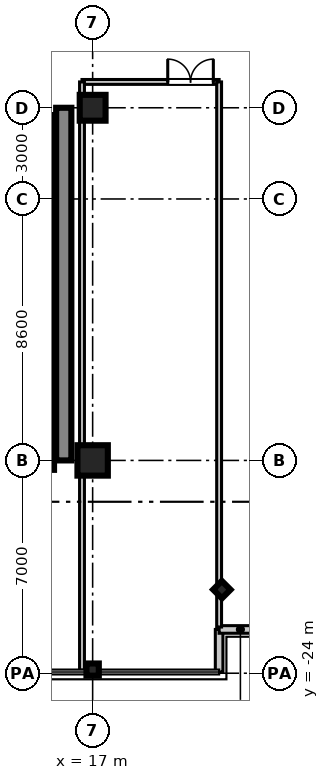
"""IFC4 building model, lengths in metres.
Left out: names, types, materials, properties, quantities, classifications, styles, units other than length and angle.
Written with IfcOpenShell. Run it as: python <this file> out.ifc"""

import sys

from ifc_helpers import new_model, si_unit, direction, frame, frame_2d, origin, origin_2d, place, context, subcontext, project, spatial, rectangle, i_section, extrude, source, transform, mapped, element, fill, save


model = new_model("IFC4")
c1 = context("Model", 3, precision=1e-05, world=origin(), true_north=direction((0.0, 1.0)))
c2 = subcontext(c1, "Body", "Model", "MODEL_VIEW")
j1 = project(units=[si_unit("LENGTHUNIT", "METRE"), si_unit("PLANEANGLEUNIT", "RADIAN")], contexts=[c1])
p1 = place(None, origin())
s1 = spatial("IfcSite", under=j1, at=p1, CompositionType="ELEMENT")
p2 = place(p1, origin())
s2 = spatial("IfcBuilding", under=s1, at=p2, CompositionType="ELEMENT")
p3 = place(p2, frame((0.0, 0.0, 249.3)))
s3 = spatial("IfcBuildingStorey", under=s2, at=p3, CompositionType="ELEMENT", Elevation=249.3)
m1 = source(origin(), c2, "Body", "SweptSolid", [
    extrude(rectangle(XDim=1.0, YDim=1.0, at=origin_2d()), origin(), (0.0, 0.0, 1.0), 3.655),
])
p4 = place(p3, frame((17.0, -17.0, 0.0), z_axis=(0.0, 0.0, 1.0), x_axis=(1.0, 0.0, 0.0)))
e1 = element("IfcColumn", 1, at=p4, inside=s3, PredefinedType="COLUMN", context=c2, shape_type="MappedRepresentation", body=[
    mapped(m1, transform((0.0, 0.0, 0.0), scale=1.0)),
])
m2 = source(origin(), c2, "Body", "SweptSolid", [
    extrude(rectangle(XDim=0.85, YDim=0.85, at=origin_2d()), origin(), (0.0, 0.0, 1.0), 3.655),
])
p5 = place(p3, frame((17.0, -5.4, 0.0), z_axis=(0.0, 0.0, 1.0), x_axis=(1.0, 0.0, 0.0)))
e2 = element("IfcColumn", 2, at=p5, inside=s3, PredefinedType="PILASTER", context=c2, shape_type="MappedRepresentation", body=[
    mapped(m2, transform((0.0, 0.0, 0.0), scale=1.0)),
])
m3 = source(origin(), c2, "Body", "SweptSolid", [
    extrude(i_section(OverallWidth=0.401, OverallDepth=0.406, WebThickness=0.016, FlangeThickness=0.025, at=origin_2d()), origin(), (0.0, 0.0, 1.0), 3.655),
])
for number, where, z_axis, x_axis in (
    (3, (17.0, -23.88, 0.0), (0.0, 0.0, 1.0), (0.0, 1.0, 0.0)),
    (4, (21.25, -21.25, 0.0), (0.0, 0.0, 1.0), (0.707, 0.707, 0.0)),
):
    element("IfcColumn", number, at=place(p3, frame(where, z_axis=z_axis, x_axis=x_axis)), inside=s3, PredefinedType="COLUMN", context=c2, shape_type="MappedRepresentation", body=[
        mapped(m3, transform((0.0, 0.0, 0.0), scale=1.0)),
    ])
m4 = source(origin(), c2, "Body", "SweptSolid", [
    extrude(rectangle(XDim=11.6, YDim=0.5, at=frame_2d((5.8, 0.0))), origin(), (0.0, 0.0, 1.0), 3.41),
])
p6 = place(p3, frame((16.05, -17.0, 0.0), z_axis=(0.0, 0.0, 1.0), x_axis=(0.0, 1.0, 0.0)))
e5 = element("IfcWall", 5, at=p6, inside=s3, PredefinedType="SHEAR", context=c2, shape_type="MappedRepresentation", body=[
    mapped(m4, transform((0.0, 0.0, 0.0), scale=1.0)),
])
m5 = source(origin(), c2, "Body", "SweptSolid", [
    extrude(rectangle(XDim=2.36, YDim=0.22, at=frame_2d((1.18, 0.0))), origin(), (0.0, 0.0, 1.0), 3.41),
])
p7 = place(p3, frame((15.62, -8.0, 0.0), z_axis=(0.0, 0.0, 1.0), x_axis=(0.0, 1.0, 0.0)))
e6 = element("IfcWall", 6, at=p7, inside=s3, PredefinedType="SHEAR", context=c2, shape_type="MappedRepresentation", body=[
    mapped(m5, transform((0.0, 0.0, 0.0), scale=1.0)),
])
m6 = source(origin(), c2, "Body", "SweptSolid", [
    extrude(rectangle(XDim=2.2, YDim=0.22, at=frame_2d((1.1, 0.0))), origin(), (0.0, 0.0, 1.0), 3.41),
])
for number, where, z_axis, x_axis in (
    (7, (15.62, -10.2, 0.0), (0.0, 0.0, 1.0), (0.0, 1.0, 0.0)),
    (8, (15.62, -12.4, 0.0), (0.0, 0.0, 1.0), (0.0, 1.0, 0.0)),
):
    element("IfcWall", number, at=place(p3, frame(where, z_axis=z_axis, x_axis=x_axis)), inside=s3, PredefinedType="SHEAR", context=c2, shape_type="MappedRepresentation", body=[
        mapped(m6, transform((0.0, 0.0, 0.0), scale=1.0)),
    ])
m7 = source(origin(), c2, "Body", "SweptSolid", [
    extrude(rectangle(XDim=2.3, YDim=0.22, at=frame_2d((1.15, 0.0))), origin(), (0.0, 0.0, 1.0), 3.41),
])
p8 = place(p3, frame((15.62, -14.7, 0.0), z_axis=(0.0, 0.0, 1.0), x_axis=(0.0, 1.0, 0.0)))
e9 = element("IfcWall", 9, at=p8, inside=s3, PredefinedType="SHEAR", context=c2, shape_type="MappedRepresentation", body=[
    mapped(m7, transform((0.0, 0.0, 0.0), scale=1.0)),
])
m8 = source(origin(), c2, "Body", "SweptSolid", [
    extrude(rectangle(XDim=2.61, YDim=0.22, at=frame_2d((1.305, 0.0))), origin(), (0.0, 0.0, 1.0), 3.41),
])
p9 = place(p3, frame((15.62, -17.31, 0.0), z_axis=(0.0, 0.0, 1.0), x_axis=(0.0, 1.0, 0.0)))
e10 = element("IfcWall", 10, at=p9, inside=s3, PredefinedType="SHEAR", context=c2, shape_type="MappedRepresentation", body=[
    mapped(m8, transform((0.0, 0.0, 0.0), scale=1.0)),
])
m9 = source(origin(), c2, "Body", "SweptSolid", [
    extrude(rectangle(XDim=1.4, YDim=0.25, at=frame_2d((0.7, 0.0))), origin(), (0.0, 0.0, 1.0), 3.41),
])
p10 = place(p3, frame((21.16, -23.96, 0.0), z_axis=(0.0, 0.0, 1.0), x_axis=(0.0, 1.0, 0.0)))
e11 = element("IfcWall", 11, at=p10, inside=s3, PredefinedType="STANDARD", context=c2, shape_type="MappedRepresentation", body=[
    mapped(m9, transform((0.0, 0.0, 0.0), scale=1.0)),
])
m10 = source(origin(), c2, "Body", "SweptSolid", [
    extrude(rectangle(XDim=1.4, YDim=0.25, at=frame_2d((0.7, 0.0))), origin(), (0.0, 0.0, 1.0), 3.41),
])
p11 = place(p3, frame((21.16, -22.56, 0.0), z_axis=(0.0, 0.0, 1.0), x_axis=(1.0, 0.0, 0.0)))
e12 = element("IfcWall", 12, at=p11, inside=s3, PredefinedType="STANDARD", context=c2, shape_type="MappedRepresentation", body=[
    mapped(m10, transform((0.0, 0.0, 0.0), scale=1.0)),
])
m11 = source(origin(), c2, "Body", "SweptSolid", [
    extrude(rectangle(XDim=4.51, YDim=0.16, at=frame_2d((2.255, 0.0))), origin(), (0.0, 0.0, 1.0), 2.75),
])
p12 = place(p3, frame((16.65, -4.55, 0.0), z_axis=(0.0, 0.0, 1.0), x_axis=(1.0, 0.0, 0.0)))
e13 = element("IfcWall", 13, at=p12, inside=s3, PredefinedType="PARTITIONING", context=c2, shape_type="MappedRepresentation", body=[
    mapped(m11, transform((0.0, 0.0, 0.0), scale=1.0)),
])
p13 = place(p12, frame((2.82, 0.0, 0.0)))
e14 = element("IfcOpeningElement", 14, at=p13, cuts=e13, PredefinedType="OPENING", context=c2, shape_type="SweptSolid", body=[
    extrude(rectangle(XDim=1.5, YDim=2.15, at=frame_2d((0.75, 1.075))), frame((0.0, 0.09, 0.0), z_axis=(0.0, -1.0, 0.0), x_axis=(1.0, 0.0, 0.0)), (0.0, 0.0, 1.0), 0.18),
])
m12 = source(origin(), c2, "Body", "SweptSolid", [
    extrude(rectangle(XDim=19.35, YDim=0.16, at=frame_2d((9.675, 0.0))), origin(), (0.0, 0.0, 1.0), 2.75),
])
p14 = place(p3, frame((16.65, -23.9, 0.0), z_axis=(0.0, 0.0, 1.0), x_axis=(0.0, 1.0, 0.0)))
e15 = element("IfcWall", 15, at=p14, inside=s3, PredefinedType="PARTITIONING", context=c2, shape_type="MappedRepresentation", body=[
    mapped(m12, transform((0.0, 0.0, 0.0), scale=1.0)),
])
m13 = source(origin(), c2, "Body", "SweptSolid", [
    extrude(rectangle(XDim=17.93, YDim=0.16, at=frame_2d((8.965, 0.0))), origin(), (0.0, 0.0, 1.0), 2.75),
])
p15 = place(p3, frame((21.16, -22.48, 0.0), z_axis=(0.0, 0.0, 1.0), x_axis=(0.0, 1.0, 0.0)))
e16 = element("IfcWall", 16, at=p15, inside=s3, PredefinedType="PARTITIONING", context=c2, shape_type="MappedRepresentation", body=[
    mapped(m13, transform((0.0, 0.0, 0.0), scale=1.0)),
])
m14 = source(origin(), c2, "Body", "SweptSolid", [
    extrude(rectangle(XDim=1.5, YDim=2.15, at=frame_2d((0.75, 1.075))), frame((0.0, 0.025, 0.0), z_axis=(0.0, -1.0, 0.0), x_axis=(1.0, 0.0, 0.0)), (0.0, 0.0, 1.0), 0.05),
])
p16 = place(p13, frame((1.5, 0.0, 0.0), z_axis=(0.0, 0.0, 1.0), x_axis=(-1.0, 0.0, 0.0)))
e17 = element("IfcDoor", 17, at=p16, inside=s3, OperationType="DOUBLE_DOOR_SINGLE_SWING", PredefinedType="DOOR", context=c2, shape_type="MappedRepresentation", body=[
    mapped(m14, transform((0.0, 0.0, 0.0), scale=1.0)),
])
fill(e14, e17)
save(model, sys.argv[1])
